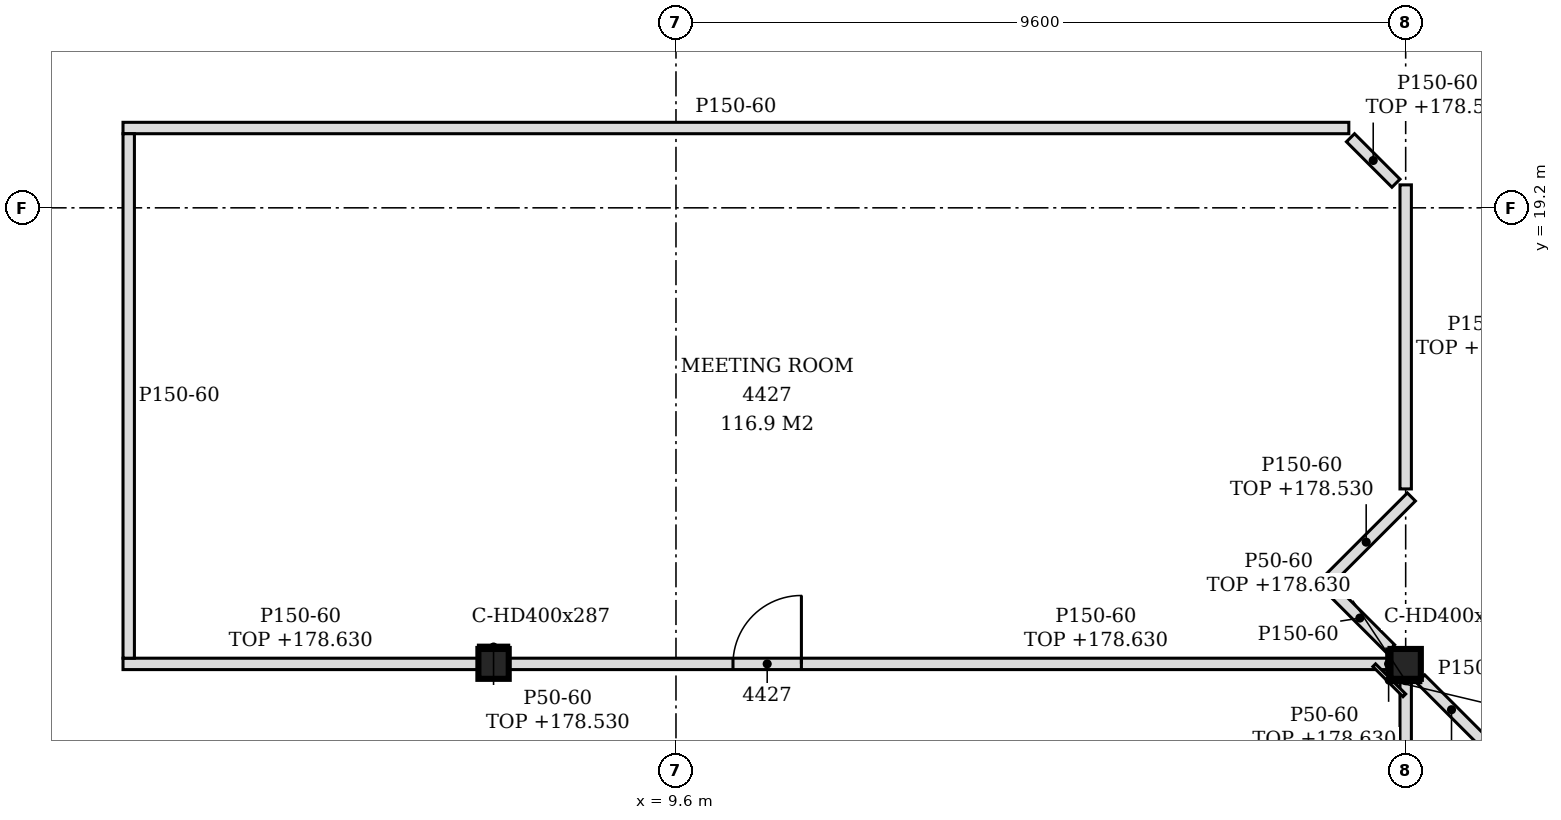
"""IFC4 building model, lengths in metres.
Left out: names, types, materials, properties, quantities, classifications, styles, units other than length and angle.
Written with IfcOpenShell. Run it as: python <this file> out.ifc"""

import sys

from ifc_helpers import new_model, si_unit, direction, frame, frame_2d, origin, origin_2d, place, context, subcontext, project, spatial, polyline, rectangle, i_section, outline, extrude, element, fill, save


model = new_model("IFC4")
c1 = context("Model", 3, precision=1e-05, world=origin(), true_north=direction((0.0, 1.0)))
c2 = subcontext(c1, "Body", "Model", "MODEL_VIEW")
j1 = project(units=[si_unit("LENGTHUNIT", "METRE"), si_unit("PLANEANGLEUNIT", "RADIAN")], contexts=[c1])
p1 = place(None, origin())
s1 = spatial("IfcSite", under=j1, at=p1, CompositionType="ELEMENT")
p2 = place(p1, origin())
s2 = spatial("IfcBuilding", under=s1, at=p2, CompositionType="ELEMENT")
p3 = place(p2, frame((0.0, 0.0, 175.8)))
s3 = spatial("IfcBuildingStorey", under=s2, at=p3, CompositionType="ELEMENT", Elevation=175.8)
for number, where, z_axis, x_axis in (
    (1, (7.2, 13.2, -0.15), (0.0, 0.0, 1.0), (1.0, 0.0, 0.0)),
    (2, (19.2, 13.2, -0.15), (0.0, 0.0, 1.0), (1.0, 0.0, 0.0)),
):
    element("IfcColumn", number, at=place(p3, frame(where, z_axis=z_axis, x_axis=x_axis)), inside=s3, PredefinedType="COLUMN", context=c2, shape_type="SweptSolid", body=[
        extrude(i_section(OverallWidth=0.399, OverallDepth=0.393, WebThickness=0.023, FlangeThickness=0.037, FilletRadius=0.015, at=origin_2d()), origin(), (0.0, 0.0, 1.0), 3.6),
    ])
p4 = place(p3, frame((19.2, 2.596, 0.0), z_axis=(0.0, 0.0, 1.0), x_axis=(0.0, 1.0, 0.0)))
e3 = element("IfcWall", 3, at=p4, inside=s3, PredefinedType="PARTITIONING", context=c2, shape_type="SweptSolid", body=[
    extrude(rectangle(XDim=10.407, YDim=0.15, at=frame_2d((5.204, 0.0))), origin(), (0.0, 0.0, 1.0), 2.83),
])
p5 = place(p4, frame((2.954, 0.0, 0.0)))
e4 = element("IfcOpeningElement", 4, at=p5, cuts=e3, PredefinedType="OPENING", context=c2, shape_type="SweptSolid", body=[
    extrude(rectangle(XDim=0.9, YDim=2.1, at=frame_2d((0.45, 1.05))), frame((0.0, 0.085, 0.0), z_axis=(0.0, -1.0, 0.0), x_axis=(1.0, 0.0, 0.0)), (0.0, 0.0, 1.0), 0.17),
])
p6 = place(p3, frame((31.072, 10.918, 0.0), z_axis=(0.0, 0.0, 1.0), x_axis=(-0.707106781187, 0.707106781187, 0.0)))
e5 = element("IfcWall", 5, at=p6, inside=s3, PredefinedType="PARTITIONING", context=c2, shape_type="SweptSolid", body=[
    extrude(rectangle(XDim=16.452, YDim=0.15, at=frame_2d((8.226, 0.0))), origin(), (0.0, 0.0, 1.0), 2.88),
])
p7 = place(p6, frame((3.462, 0.0, 0.0)))
e6 = element("IfcOpeningElement", 6, at=p7, cuts=e5, PredefinedType="OPENING", context=c2, shape_type="SweptSolid", body=[
    extrude(rectangle(XDim=0.9, YDim=2.1, at=frame_2d((0.45, 1.05))), frame((0.0, 0.085, 0.0), z_axis=(0.0, -1.0, 0.0), x_axis=(1.0, 0.0, 0.0)), (0.0, 0.0, 1.0), 0.17),
])
p8 = place(p6, frame((8.046, 0.0, 0.0)))
e7 = element("IfcOpeningElement", 7, at=p8, cuts=e5, PredefinedType="OPENING", context=c2, shape_type="SweptSolid", body=[
    extrude(rectangle(XDim=0.9, YDim=2.1, at=frame_2d((0.45, 1.05))), frame((0.0, 0.085, 0.0), z_axis=(0.0, -1.0, 0.0), x_axis=(1.0, 0.0, 0.0)), (0.0, 0.0, 1.0), 0.17),
])
p9 = place(p6, frame((12.53, 0.0, 0.0)))
e8 = element("IfcOpeningElement", 8, at=p9, cuts=e5, PredefinedType="OPENING", context=c2, shape_type="SweptSolid", body=[
    extrude(rectangle(XDim=0.9, YDim=2.1, at=frame_2d((0.45, 1.05))), frame((0.0, 0.085, 0.0), z_axis=(0.0, -1.0, 0.0), x_axis=(1.0, 0.0, 0.0)), (0.0, 0.0, 1.0), 0.17),
])
p10 = place(p3, frame((20.208, 12.086, 0.0), z_axis=(0.0, 0.0, 1.0), x_axis=(0.706756381459, 0.707457007363, 0.0)))
e9 = element("IfcWall", 9, at=p10, inside=s3, PredefinedType="PARTITIONING", context=c2, shape_type="SweptSolid", body=[
    extrude(rectangle(XDim=1.394, YDim=0.15, at=frame_2d((0.697, 0.0))), origin(), (0.0, 0.0, 1.0), 3.45),
])
p11 = place(p3, frame((20.208, 12.192, 0.0), z_axis=(0.0, 0.0, 1.0), x_axis=(-0.70721334539, 0.707000200921, 0.0)))
e10 = element("IfcWall", 10, at=p11, inside=s3, PredefinedType="PARTITIONING", context=c2, shape_type="SweptSolid", body=[
    extrude(rectangle(XDim=1.146, YDim=0.15, at=frame_2d((0.573, 0.0))), origin(), (0.0, 0.0, 1.0), 3.45),
])
p12 = place(p3, frame((2.325, 13.2, 0.0), z_axis=(0.0, 0.0, 1.0), x_axis=(1.0, 0.0, 0.0)))
e11 = element("IfcWall", 11, at=p12, inside=s3, PredefinedType="PARTITIONING", context=c2, shape_type="SweptSolid", body=[
    extrude(rectangle(XDim=4.676, YDim=0.15, at=frame_2d((2.338, 0.0))), origin(), (0.0, 0.0, 1.0), 2.83),
])
p13 = place(p3, frame((7.399, 13.2, 0.0), z_axis=(0.0, 0.0, 1.0), x_axis=(1.0, 0.0, 0.0)))
e12 = element("IfcWall", 12, at=p13, inside=s3, PredefinedType="PARTITIONING", context=c2, shape_type="SweptSolid", body=[
    extrude(rectangle(XDim=11.601, YDim=0.15, at=frame_2d((5.801, 0.0))), origin(), (0.0, 0.0, 1.0), 2.83),
])
p14 = place(p13, frame((2.95, 0.0, 0.0)))
e13 = element("IfcOpeningElement", 13, at=p14, cuts=e12, PredefinedType="OPENING", context=c2, shape_type="SweptSolid", body=[
    extrude(rectangle(XDim=0.9, YDim=2.1, at=frame_2d((0.45, 1.05))), frame((0.0, 0.085, 0.0), z_axis=(0.0, -1.0, 0.0), x_axis=(1.0, 0.0, 0.0)), (0.0, 0.0, 1.0), 0.17),
])
p15 = place(p3, frame((2.4, 13.275, 0.0), z_axis=(0.0, 0.0, 1.0), x_axis=(0.0, 1.0, 0.0)))
e14 = element("IfcWall", 14, at=p15, inside=s3, PredefinedType="PARTITIONING", context=c2, shape_type="SweptSolid", body=[
    extrude(outline(polyline([(0.0, 0.0), (6.9, 0.0), (6.9, 3.45), (5.43, 3.45), (5.428, 2.88), (5.22, 2.88), (5.218, 3.45), (0.075, 3.45), (0.073, 2.83), (0.0, 2.83), (0.0, 0.0)])), frame((0.0, 0.075, 0.0), z_axis=(0.0, -1.0, 0.0), x_axis=(1.0, 0.0, 0.0)), (0.0, 0.0, 1.0), 0.15),
])
p16 = place(p3, frame((19.002, 13.398, 0.0), z_axis=(0.0, 0.0, 1.0), x_axis=(-0.707000200921, 0.70721334539, 0.0)))
e15 = element("IfcWall", 15, at=p16, inside=s3, PredefinedType="PARTITIONING", context=c2, shape_type="SweptSolid", body=[
    extrude(rectangle(XDim=1.146, YDim=0.15, at=frame_2d((0.573, 0.0))), origin(), (0.0, 0.0, 1.0), 3.45),
])
p17 = place(p3, frame((18.086, 14.208, 0.0), z_axis=(0.0, 0.0, 1.0), x_axis=(0.70739723372, 0.706816209298, 0.0)))
e16 = element("IfcWall", 16, at=p17, inside=s3, PredefinedType="PARTITIONING", context=c2, shape_type="SweptSolid", body=[
    extrude(rectangle(XDim=1.681, YDim=0.15, at=frame_2d((0.84, 0.0))), origin(), (0.0, 0.0, 1.0), 2.73),
])
p18 = place(p3, frame((19.2, 15.502, 0.0), z_axis=(0.0, 0.0, 1.0), x_axis=(0.0, 1.0, 0.0)))
e17 = element("IfcWall", 17, at=p18, inside=s3, PredefinedType="PARTITIONING", context=c2, shape_type="SweptSolid", body=[
    extrude(rectangle(XDim=4.0, YDim=0.15, at=frame_2d((2.0, 0.0))), origin(), (0.0, 0.0, 1.0), 2.73),
])
p19 = place(p3, frame((19.072, 19.524, 0.0), z_axis=(0.0, 0.0, 1.0), x_axis=(-0.706962429495, 0.707251103415, 0.0)))
e18 = element("IfcWall", 18, at=p19, inside=s3, PredefinedType="PARTITIONING", context=c2, shape_type="SweptSolid", body=[
    extrude(rectangle(XDim=0.846, YDim=0.15, at=frame_2d((0.423, 0.0))), origin(), (0.0, 0.0, 1.0), 2.73),
])
p20 = place(p3, frame((2.325, 20.25, 0.0), z_axis=(0.0, 0.0, 1.0), x_axis=(1.0, 0.0, 0.0)))
e19 = element("IfcWall", 19, at=p20, inside=s3, PredefinedType="PARTITIONING", context=c2, shape_type="SweptSolid", body=[
    extrude(outline(polyline([(0.0, 0.0), (16.127, 0.0), (16.127, 3.45), (5.025, 3.45), (5.023, 2.73), (4.725, 2.73), (4.723, 3.45), (0.0, 3.45), (0.0, 0.0)])), frame((0.0, 0.075, 0.0), z_axis=(0.0, -1.0, 0.0), x_axis=(1.0, 0.0, 0.0)), (0.0, 0.0, 1.0), 0.15),
])
p21 = place(p3, frame((18.976, 13.003, 0.0), z_axis=(0.0, 0.0, 1.0), x_axis=(0.0, 1.0, 0.0)))
e20 = element("IfcWall", 20, at=p21, inside=s3, PredefinedType="PARTITIONING", context=c2, shape_type="SweptSolid", body=[
    extrude(rectangle(XDim=0.393, YDim=0.05, at=frame_2d((0.197, 0.0))), origin(), (0.0, 0.0, 1.0), 2.83),
])
p22 = place(p3, frame((19.182, 12.786, 0.0), z_axis=(0.0, 0.0, 1.0), x_axis=(-0.707106781187, 0.707106781187, 0.0)))
e21 = element("IfcWall", 21, at=p22, inside=s3, PredefinedType="PARTITIONING", context=c2, shape_type="SweptSolid", body=[
    extrude(rectangle(XDim=0.56, YDim=0.05, at=frame_2d((0.28, 0.0))), origin(), (0.0, 0.0, 1.0), 2.83),
])
p23 = place(p3, frame((7.0, 13.421, 0.0), z_axis=(0.0, 0.0, 1.0), x_axis=(1.0, 0.0, 0.0)))
e22 = element("IfcWall", 22, at=p23, inside=s3, PredefinedType="PARTITIONING", context=c2, shape_type="SweptSolid", body=[
    extrude(rectangle(XDim=0.399, YDim=0.05, at=frame_2d((0.199, 0.0))), origin(), (0.0, 0.0, 1.0), 2.73),
])
p24 = place(p3, frame((19.0, 12.979, 0.0), z_axis=(0.0, 0.0, 1.0), x_axis=(1.0, 0.0, 0.0)))
e23 = element("IfcWall", 23, at=p24, inside=s3, PredefinedType="PARTITIONING", context=c2, shape_type="SweptSolid", body=[
    extrude(rectangle(XDim=0.399, YDim=0.05, at=frame_2d((0.199, 0.0))), origin(), (0.0, 0.0, 1.0), 2.83),
])
p25 = place(p14, origin())
e24 = element("IfcDoor", 24, at=p25, inside=s3, OperationType="SINGLE_SWING_RIGHT", PredefinedType="DOOR", context=c2, shape_type="SweptSolid", body=[
    extrude(rectangle(XDim=0.9, YDim=2.1, at=frame_2d((0.45, 1.05))), frame((0.0, 0.025, 0.0), z_axis=(0.0, -1.0, 0.0), x_axis=(1.0, 0.0, 0.0)), (0.0, 0.0, 1.0), 0.05),
])
fill(e13, e24)
save(model, sys.argv[1])
